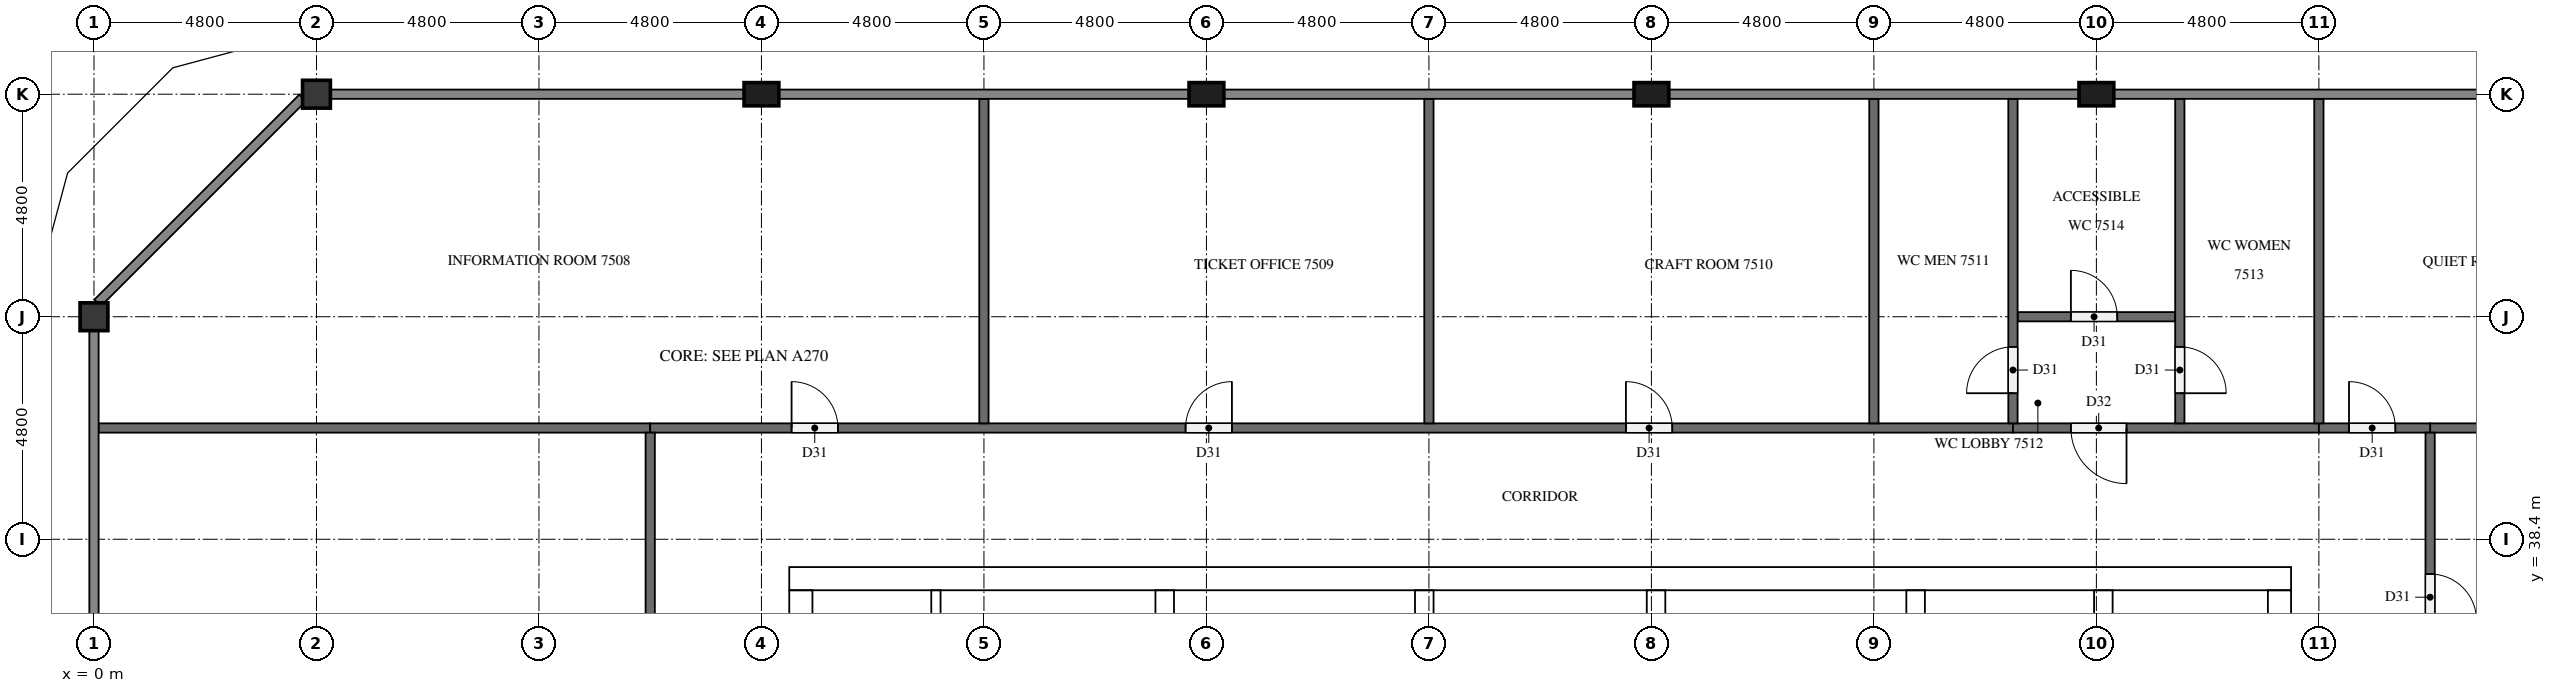
"""IFC4 building model, lengths in metres.
Left out: names, types, materials, properties, quantities, classifications, styles, units other than length and angle.
Written with IfcOpenShell. Run it as: python <this file> out.ifc"""

import sys

from ifc_helpers import new_model, si_unit, direction, frame, frame_2d, origin, origin_2d, place, context, subcontext, project, spatial, rectangle, extrude, element, fill, save


model = new_model("IFC4")
c1 = context("Model", 3, precision=1e-05, world=origin(), true_north=direction((0.0, 1.0)))
c2 = subcontext(c1, "Body", "Model", "MODEL_VIEW")
j1 = project(units=[si_unit("LENGTHUNIT", "METRE"), si_unit("PLANEANGLEUNIT", "RADIAN")], contexts=[c1])
p1 = place(None, origin())
s1 = spatial("IfcSite", under=j1, at=p1, CompositionType="ELEMENT")
p2 = place(p1, origin())
s2 = spatial("IfcBuilding", under=s1, at=p2, CompositionType="ELEMENT")
p3 = place(p2, frame((0.0, 0.0, 286.1)))
s3 = spatial("IfcBuildingStorey", under=s2, at=p3, CompositionType="ELEMENT", Elevation=286.1)
p4 = place(p3, frame((15.0, 37.55, 0.0), z_axis=(0.0, 0.0, 1.0), x_axis=(1.0, 0.0, 0.0)))
e1 = element("IfcWall", 1, at=p4, inside=s3, PredefinedType="SHEAR", context=c2, shape_type="SweptSolid", body=[
    extrude(rectangle(XDim=32.4, YDim=0.5, at=frame_2d((16.2, 0.0))), origin(), (0.0, 0.0, 1.0), 5.1),
])
p5 = place(p4, frame((15.3, 0.0, 0.0)))
e2 = element("IfcOpeningElement", 2, at=p5, cuts=e1, PredefinedType="OPENING", context=c2, shape_type="SweptSolid", body=[
    extrude(rectangle(XDim=1.8, YDim=2.1, at=frame_2d((0.9, 1.05))), frame((0.0, 0.26, 0.0), z_axis=(0.0, -1.0, 0.0), x_axis=(1.0, 0.0, 0.0)), (0.0, 0.0, 1.0), 0.52),
])
p6 = place(p4, frame((1.282, 0.0, 0.0)))
e3 = element("IfcOpeningElement", 3, at=p6, cuts=e1, PredefinedType="OPENING", context=c2, shape_type="SweptSolid", body=[
    extrude(rectangle(XDim=1.0, YDim=2.1, at=frame_2d((0.5, 1.05))), frame((0.0, 0.26, 0.0), z_axis=(0.0, -1.0, 0.0), x_axis=(1.0, 0.0, 0.0)), (0.0, 0.0, 1.0), 0.52),
])
p7 = place(p4, frame((5.082, 0.0, 0.0)))
e4 = element("IfcOpeningElement", 4, at=p7, cuts=e1, PredefinedType="OPENING", context=c2, shape_type="SweptSolid", body=[
    extrude(rectangle(XDim=1.0, YDim=2.1, at=frame_2d((0.5, 1.05))), frame((0.0, 0.26, 0.0), z_axis=(0.0, -1.0, 0.0), x_axis=(1.0, 0.0, 0.0)), (0.0, 0.0, 1.0), 0.52),
])
p8 = place(p3, frame((15.25, 15.5, 0.0), z_axis=(0.0, 0.0, 1.0), x_axis=(0.0, 1.0, 0.0)))
e5 = element("IfcWall", 5, at=p8, inside=s3, PredefinedType="SHEAR", context=c2, shape_type="SweptSolid", body=[
    extrude(rectangle(XDim=21.8, YDim=0.5, at=frame_2d((10.9, 0.0))), origin(), (0.0, 0.0, 1.0), 5.1),
])
p9 = place(p8, frame((5.26, 0.0, 0.0)))
e6 = element("IfcOpeningElement", 6, at=p9, cuts=e5, PredefinedType="OPENING", context=c2, shape_type="SweptSolid", body=[
    extrude(rectangle(XDim=1.2, YDim=2.1, at=frame_2d((0.6, 1.05))), frame((0.0, 0.26, 0.0), z_axis=(0.0, -1.0, 0.0), x_axis=(1.0, 0.0, 0.0)), (0.0, 0.0, 1.0), 0.52),
])
p10 = place(p3, frame((47.15, 15.5, 0.0), z_axis=(0.0, 0.0, 1.0), x_axis=(0.0, 1.0, 0.0)))
e7 = element("IfcWall", 7, at=p10, inside=s3, PredefinedType="SHEAR", context=c2, shape_type="SweptSolid", body=[
    extrude(rectangle(XDim=21.8, YDim=0.5, at=frame_2d((10.9, 0.0))), origin(), (0.0, 0.0, 1.0), 5.1),
])
p11 = place(p10, frame((10.6, 0.0, 0.0)))
e8 = element("IfcOpeningElement", 8, at=p11, cuts=e7, PredefinedType="OPENING", context=c2, shape_type="SweptSolid", body=[
    extrude(rectangle(XDim=1.2, YDim=2.1, at=frame_2d((0.6, 1.05))), frame((0.0, 0.26, 0.0), z_axis=(0.0, -1.0, 0.0), x_axis=(1.0, 0.0, 0.0)), (0.0, 0.0, 1.0), 0.52),
])
p12 = place(p3, frame((23.1, 15.5, 0.0), z_axis=(0.0, 0.0, 1.0), x_axis=(0.0, 1.0, 0.0)))
e9 = element("IfcWall", 9, at=p12, inside=s3, PredefinedType="SHEAR", context=c2, shape_type="SweptSolid", body=[
    extrude(rectangle(XDim=21.8, YDim=0.4, at=frame_2d((10.9, 0.0))), origin(), (0.0, 0.0, 1.0), 5.1),
])
p13 = place(p3, frame((39.3, 27.75, 0.0), z_axis=(0.0, 0.0, 1.0), x_axis=(0.0, 1.0, 0.0)))
e10 = element("IfcWall", 10, at=p13, inside=s3, PredefinedType="SHEAR", context=c2, shape_type="SweptSolid", body=[
    extrude(rectangle(XDim=9.55, YDim=0.4, at=frame_2d((4.775, 0.0))), origin(), (0.0, 0.0, 1.0), 5.1),
])
p14 = place(p3, frame((43.35, 27.75, 0.0), z_axis=(0.0, 0.0, 1.0), x_axis=(0.0, 1.0, 0.0)))
e11 = element("IfcWall", 11, at=p14, inside=s3, PredefinedType="SHEAR", context=c2, shape_type="SweptSolid", body=[
    extrude(rectangle(XDim=9.55, YDim=0.4, at=frame_2d((4.775, 0.0))), origin(), (0.0, 0.0, 1.0), 5.1),
])
p15 = place(p14, frame((7.65, 0.0, 0.0)))
e12 = element("IfcOpeningElement", 12, at=p15, cuts=e11, PredefinedType="OPENING", context=c2, shape_type="SweptSolid", body=[
    extrude(rectangle(XDim=1.2, YDim=2.1, at=frame_2d((0.6, 1.05))), frame((0.0, 0.21, 0.0), z_axis=(0.0, -1.0, 0.0), x_axis=(1.0, 0.0, 0.0)), (0.0, 0.0, 1.0), 0.42),
])
for number, where, z_axis, x_axis in (
    (13, (28.7, 33.75, 0.0), (0.0, 0.0, 1.0), (0.0, 1.0, 0.0)),
    (14, (33.7, 33.75, 0.0), (0.0, 0.0, 1.0), (0.0, 1.0, 0.0)),
):
    element("IfcWall", number, at=place(p3, frame(where, z_axis=z_axis, x_axis=x_axis)), inside=s3, PredefinedType="SHEAR", context=c2, shape_type="SweptSolid", body=[
        extrude(rectangle(XDim=3.55, YDim=0.4, at=frame_2d((1.775, 0.0))), origin(), (0.0, 0.0, 1.0), 5.1),
    ])
for number, where, z_axis, x_axis in (
    (15, (43.2, 48.0, 0.0), (0.0, 0.0, 1.0), (1.0, 0.0, 0.0)),
    (16, (33.6, 48.0, 0.0), (0.0, 0.0, 1.0), (1.0, 0.0, 0.0)),
    (17, (24.0, 48.0, 0.0), (0.0, 0.0, 1.0), (1.0, 0.0, 0.0)),
    (18, (14.4, 48.0, 0.0), (0.0, 0.0, 1.0), (1.0, 0.0, 0.0)),
):
    element("IfcColumn", number, at=place(p3, frame(where, z_axis=z_axis, x_axis=x_axis)), inside=s3, PredefinedType="COLUMN", context=c2, shape_type="SweptSolid", body=[
        extrude(rectangle(XDim=0.75, YDim=0.5, at=origin_2d()), origin(), (0.0, 0.0, 1.0), 5.1),
    ])
for number, where, z_axis, x_axis in (
    (19, (4.8, 48.0, 0.0), (0.0, 0.0, 1.0), (1.0, 0.0, 0.0)),
    (20, (0.0, 43.2, 0.0), (0.0, 0.0, 1.0), (1.0, 0.0, 0.0)),
):
    element("IfcColumn", number, at=place(p3, frame(where, z_axis=z_axis, x_axis=x_axis)), inside=s3, PredefinedType="COLUMN", context=c2, shape_type="SweptSolid", body=[
        extrude(rectangle(XDim=0.6, YDim=0.6, at=origin_2d()), origin(), (0.0, 0.0, 1.0), 5.1),
    ])
p16 = place(p3, frame((18.164, 31.45, 0.0), z_axis=(0.0, 0.0, 1.0), x_axis=(0.0, 1.0, 0.0)))
e21 = element("IfcWall", 21, at=p16, inside=s3, PredefinedType="PARTITIONING", context=c2, shape_type="SweptSolid", body=[
    extrude(rectangle(XDim=5.85, YDim=0.2, at=frame_2d((2.925, 0.0))), origin(), (0.0, 0.0, 1.0), 5.1),
])
p17 = place(p3, frame((0.1, 40.8, 0.0), z_axis=(0.0, 0.0, 1.0), x_axis=(1.0, 0.0, 0.0)))
e22 = element("IfcWall", 22, at=p17, inside=s3, PredefinedType="PARTITIONING", context=c2, shape_type="SweptSolid", body=[
    extrude(rectangle(XDim=11.9, YDim=0.2, at=frame_2d((5.95, 0.0))), origin(), (0.0, 0.0, 1.0), 5.1),
])
p18 = place(p3, frame((50.4, 40.8, 0.0), z_axis=(0.0, 0.0, 1.0), x_axis=(1.0, 0.0, 0.0)))
e23 = element("IfcWall", 23, at=p18, inside=s3, PredefinedType="PARTITIONING", context=c2, shape_type="SweptSolid", body=[
    extrude(rectangle(XDim=7.1, YDim=0.2, at=frame_2d((3.55, 0.0))), origin(), (0.0, 0.0, 1.0), 5.1),
])
p19 = place(p3, frame((12.0, 40.8, 0.0), z_axis=(0.0, 0.0, 1.0), x_axis=(1.0, 0.0, 0.0)))
e24 = element("IfcWall", 24, at=p19, inside=s3, PredefinedType="PARTITIONING", context=c2, shape_type="SweptSolid", body=[
    extrude(rectangle(XDim=29.4, YDim=0.2, at=frame_2d((14.7, 0.0))), origin(), (0.0, 0.0, 1.0), 5.1),
])
p20 = place(p19, frame((3.05, 0.0, 0.0)))
e25 = element("IfcOpeningElement", 25, at=p20, cuts=e24, PredefinedType="OPENING", context=c2, shape_type="SweptSolid", body=[
    extrude(rectangle(XDim=1.0, YDim=2.1, at=frame_2d((0.5, 1.05))), frame((0.0, 0.11, 0.0), z_axis=(0.0, -1.0, 0.0), x_axis=(1.0, 0.0, 0.0)), (0.0, 0.0, 1.0), 0.22),
])
p21 = place(p19, frame((11.55, 0.0, 0.0)))
e26 = element("IfcOpeningElement", 26, at=p21, cuts=e24, PredefinedType="OPENING", context=c2, shape_type="SweptSolid", body=[
    extrude(rectangle(XDim=1.0, YDim=2.1, at=frame_2d((0.5, 1.05))), frame((0.0, 0.11, 0.0), z_axis=(0.0, -1.0, 0.0), x_axis=(1.0, 0.0, 0.0)), (0.0, 0.0, 1.0), 0.22),
])
p22 = place(p19, frame((21.05, 0.0, 0.0)))
e27 = element("IfcOpeningElement", 27, at=p22, cuts=e24, PredefinedType="OPENING", context=c2, shape_type="SweptSolid", body=[
    extrude(rectangle(XDim=1.0, YDim=2.1, at=frame_2d((0.5, 1.05))), frame((0.0, 0.11, 0.0), z_axis=(0.0, -1.0, 0.0), x_axis=(1.0, 0.0, 0.0)), (0.0, 0.0, 1.0), 0.22),
])
p23 = place(p3, frame((48.0, 40.8, 0.0), z_axis=(0.0, 0.0, 1.0), x_axis=(-1.0, 0.0, 0.0)))
e28 = element("IfcWall", 28, at=p23, inside=s3, PredefinedType="PARTITIONING", context=c2, shape_type="SweptSolid", body=[
    extrude(rectangle(XDim=6.6, YDim=0.2, at=frame_2d((3.3, 0.0))), origin(), (0.0, 0.0, 1.0), 5.1),
])
p24 = place(p23, frame((4.15, 0.0, 0.0)))
e29 = element("IfcOpeningElement", 29, at=p24, cuts=e28, PredefinedType="OPENING", context=c2, shape_type="SweptSolid", body=[
    extrude(rectangle(XDim=1.2, YDim=2.1, at=frame_2d((0.6, 1.05))), frame((0.0, 0.11, 0.0), z_axis=(0.0, -1.0, 0.0), x_axis=(1.0, 0.0, 0.0)), (0.0, 0.0, 1.0), 0.22),
])
p25 = place(p3, frame((48.0, 40.8, 0.0), z_axis=(0.0, 0.0, 1.0), x_axis=(1.0, 0.0, 0.0)))
e30 = element("IfcWall", 30, at=p25, inside=s3, PredefinedType="PARTITIONING", context=c2, shape_type="SweptSolid", body=[
    extrude(rectangle(XDim=2.4, YDim=0.2, at=frame_2d((1.2, 0.0))), origin(), (0.0, 0.0, 1.0), 5.1),
])
p26 = place(p25, frame((0.65, 0.0, 0.0)))
e31 = element("IfcOpeningElement", 31, at=p26, cuts=e30, PredefinedType="OPENING", context=c2, shape_type="SweptSolid", body=[
    extrude(rectangle(XDim=1.0, YDim=2.1, at=frame_2d((0.5, 1.05))), frame((0.0, 0.11, 0.0), z_axis=(0.0, -1.0, 0.0), x_axis=(1.0, 0.0, 0.0)), (0.0, 0.0, 1.0), 0.22),
])
p27 = place(p3, frame((41.5, 43.2, 0.0), z_axis=(0.0, 0.0, 1.0), x_axis=(1.0, 0.0, 0.0)))
e32 = element("IfcWall", 32, at=p27, inside=s3, PredefinedType="PARTITIONING", context=c2, shape_type="SweptSolid", body=[
    extrude(rectangle(XDim=3.4, YDim=0.2, at=frame_2d((1.7, 0.0))), origin(), (0.0, 0.0, 1.0), 5.1),
])
p28 = place(p27, frame((1.15, 0.0, 0.0)))
e33 = element("IfcOpeningElement", 33, at=p28, cuts=e32, PredefinedType="OPENING", context=c2, shape_type="SweptSolid", body=[
    extrude(rectangle(XDim=1.0, YDim=2.1, at=frame_2d((0.5, 1.05))), frame((0.0, 0.11, 0.0), z_axis=(0.0, -1.0, 0.0), x_axis=(1.0, 0.0, 0.0)), (0.0, 0.0, 1.0), 0.22),
])
p29 = place(p3, frame((12.0, 12.1, 0.0), z_axis=(0.0, 0.0, 1.0), x_axis=(0.0, 1.0, 0.0)))
e34 = element("IfcWall", 34, at=p29, inside=s3, PredefinedType="PARTITIONING", context=c2, shape_type="SweptSolid", body=[
    extrude(rectangle(XDim=28.6, YDim=0.2, at=frame_2d((14.3, 0.0))), origin(), (0.0, 0.0, 1.0), 5.1),
])
p30 = place(p29, frame((3.05, 0.0, 0.0)))
e35 = element("IfcOpeningElement", 35, at=p30, cuts=e34, PredefinedType="OPENING", context=c2, shape_type="SweptSolid", body=[
    extrude(rectangle(XDim=1.0, YDim=2.1, at=frame_2d((0.5, 1.05))), frame((0.0, 0.11, 0.0), z_axis=(0.0, -1.0, 0.0), x_axis=(1.0, 0.0, 0.0)), (0.0, 0.0, 1.0), 0.22),
])
p31 = place(p29, frame((11.45, 0.0, 0.0)))
e36 = element("IfcOpeningElement", 36, at=p31, cuts=e34, PredefinedType="OPENING", context=c2, shape_type="SweptSolid", body=[
    extrude(rectangle(XDim=1.0, YDim=2.1, at=frame_2d((0.5, 1.05))), frame((0.0, 0.11, 0.0), z_axis=(0.0, -1.0, 0.0), x_axis=(1.0, 0.0, 0.0)), (0.0, 0.0, 1.0), 0.22),
])
p32 = place(p29, frame((22.15, 0.0, 0.0)))
e37 = element("IfcOpeningElement", 37, at=p32, cuts=e34, PredefinedType="OPENING", context=c2, shape_type="SweptSolid", body=[
    extrude(rectangle(XDim=1.0, YDim=2.1, at=frame_2d((0.5, 1.05))), frame((0.0, 0.11, 0.0), z_axis=(0.0, -1.0, 0.0), x_axis=(1.0, 0.0, 0.0)), (0.0, 0.0, 1.0), 0.22),
])
for number, where, z_axis, x_axis in (
    (38, (19.2, 40.9, 0.0), (0.0, 0.0, 1.0), (0.0, 1.0, 0.0)),
    (39, (28.8, 40.9, 0.0), (0.0, 0.0, 1.0), (0.0, 1.0, 0.0)),
    (40, (38.4, 40.9, 0.0), (0.0, 0.0, 1.0), (0.0, 1.0, 0.0)),
):
    element("IfcWall", number, at=place(p3, frame(where, z_axis=z_axis, x_axis=x_axis)), inside=s3, PredefinedType="PARTITIONING", context=c2, shape_type="SweptSolid", body=[
        extrude(rectangle(XDim=7.0, YDim=0.2, at=frame_2d((3.5, 0.0))), origin(), (0.0, 0.0, 1.0), 5.1),
    ])
p33 = place(p3, frame((41.4, 40.9, 0.0), z_axis=(0.0, 0.0, 1.0), x_axis=(0.0, 1.0, 0.0)))
e41 = element("IfcWall", 41, at=p33, inside=s3, PredefinedType="PARTITIONING", context=c2, shape_type="SweptSolid", body=[
    extrude(rectangle(XDim=7.0, YDim=0.2, at=frame_2d((3.5, 0.0))), origin(), (0.0, 0.0, 1.0), 5.1),
])
p34 = place(p33, frame((0.65, 0.0, 0.0)))
e42 = element("IfcOpeningElement", 42, at=p34, cuts=e41, PredefinedType="OPENING", context=c2, shape_type="SweptSolid", body=[
    extrude(rectangle(XDim=1.0, YDim=2.1, at=frame_2d((0.5, 1.05))), frame((0.0, 0.11, 0.0), z_axis=(0.0, -1.0, 0.0), x_axis=(1.0, 0.0, 0.0)), (0.0, 0.0, 1.0), 0.22),
])
p35 = place(p3, frame((45.0, 47.9, 0.0), z_axis=(0.0, 0.0, 1.0), x_axis=(0.0, -1.0, 0.0)))
e43 = element("IfcWall", 43, at=p35, inside=s3, PredefinedType="PARTITIONING", context=c2, shape_type="SweptSolid", body=[
    extrude(rectangle(XDim=7.0, YDim=0.2, at=frame_2d((3.5, 0.0))), origin(), (0.0, 0.0, 1.0), 5.1),
])
p36 = place(p35, frame((5.35, 0.0, 0.0)))
e44 = element("IfcOpeningElement", 44, at=p36, cuts=e43, PredefinedType="OPENING", context=c2, shape_type="SweptSolid", body=[
    extrude(rectangle(XDim=1.0, YDim=2.1, at=frame_2d((0.5, 1.05))), frame((0.0, 0.11, 0.0), z_axis=(0.0, -1.0, 0.0), x_axis=(1.0, 0.0, 0.0)), (0.0, 0.0, 1.0), 0.22),
])
p37 = place(p3, frame((48.0, 40.9, 0.0), z_axis=(0.0, 0.0, 1.0), x_axis=(0.0, 1.0, 0.0)))
e45 = element("IfcWall", 45, at=p37, inside=s3, PredefinedType="PARTITIONING", context=c2, shape_type="SweptSolid", body=[
    extrude(rectangle(XDim=7.0, YDim=0.2, at=frame_2d((3.5, 0.0))), origin(), (0.0, 0.0, 1.0), 5.1),
])
p38 = place(p3, frame((50.4, 40.7, 0.0), z_axis=(0.0, 0.0, 1.0), x_axis=(0.0, -1.0, 0.0)))
e46 = element("IfcWall", 46, at=p38, inside=s3, PredefinedType="PARTITIONING", context=c2, shape_type="SweptSolid", body=[
    extrude(rectangle(XDim=28.6, YDim=0.2, at=frame_2d((14.3, 0.0))), origin(), (0.0, 0.0, 1.0), 5.1),
])
p39 = place(p38, frame((22.15, 0.0, 0.0)))
e47 = element("IfcOpeningElement", 47, at=p39, cuts=e46, PredefinedType="OPENING", context=c2, shape_type="SweptSolid", body=[
    extrude(rectangle(XDim=1.0, YDim=2.1, at=frame_2d((0.5, 1.05))), frame((0.0, 0.11, 0.0), z_axis=(0.0, -1.0, 0.0), x_axis=(1.0, 0.0, 0.0)), (0.0, 0.0, 1.0), 0.22),
])
p40 = place(p38, frame((11.45, 0.0, 0.0)))
e48 = element("IfcOpeningElement", 48, at=p40, cuts=e46, PredefinedType="OPENING", context=c2, shape_type="SweptSolid", body=[
    extrude(rectangle(XDim=1.0, YDim=2.1, at=frame_2d((0.5, 1.05))), frame((0.0, 0.11, 0.0), z_axis=(0.0, -1.0, 0.0), x_axis=(1.0, 0.0, 0.0)), (0.0, 0.0, 1.0), 0.22),
])
p41 = place(p38, frame((3.05, 0.0, 0.0)))
e49 = element("IfcOpeningElement", 49, at=p41, cuts=e46, PredefinedType="OPENING", context=c2, shape_type="SweptSolid", body=[
    extrude(rectangle(XDim=1.0, YDim=2.1, at=frame_2d((0.5, 1.05))), frame((0.0, 0.11, 0.0), z_axis=(0.0, -1.0, 0.0), x_axis=(1.0, 0.0, 0.0)), (0.0, 0.0, 1.0), 0.22),
])
p42 = place(p5, origin())
e50 = element("IfcDoor", 50, at=p42, inside=s3, OperationType="DOUBLE_DOOR_SINGLE_SWING", PredefinedType="DOOR", context=c2, shape_type="SweptSolid", body=[
    extrude(rectangle(XDim=1.8, YDim=2.1, at=frame_2d((0.9, 1.05))), frame((0.0, 0.025, 0.0), z_axis=(0.0, -1.0, 0.0), x_axis=(1.0, 0.0, 0.0)), (0.0, 0.0, 1.0), 0.05),
])
fill(e2, e50)
p43 = place(p6, origin())
e51 = element("IfcDoor", 51, at=p43, inside=s3, OperationType="SINGLE_SWING_RIGHT", PredefinedType="DOOR", context=c2, shape_type="SweptSolid", body=[
    extrude(rectangle(XDim=1.0, YDim=2.1, at=frame_2d((0.5, 1.05))), frame((0.0, 0.025, 0.0), z_axis=(0.0, -1.0, 0.0), x_axis=(1.0, 0.0, 0.0)), (0.0, 0.0, 1.0), 0.05),
])
fill(e3, e51)
p44 = place(p7, origin())
e52 = element("IfcDoor", 52, at=p44, inside=s3, OperationType="SINGLE_SWING_LEFT", PredefinedType="DOOR", context=c2, shape_type="SweptSolid", body=[
    extrude(rectangle(XDim=1.0, YDim=2.1, at=frame_2d((0.5, 1.05))), frame((0.0, 0.025, 0.0), z_axis=(0.0, -1.0, 0.0), x_axis=(1.0, 0.0, 0.0)), (0.0, 0.0, 1.0), 0.05),
])
fill(e4, e52)
p45 = place(p20, origin())
e53 = element("IfcDoor", 53, at=p45, inside=s3, OperationType="SINGLE_SWING_LEFT", PredefinedType="DOOR", context=c2, shape_type="SweptSolid", body=[
    extrude(rectangle(XDim=1.0, YDim=2.1, at=frame_2d((0.5, 1.05))), frame((0.0, 0.025, 0.0), z_axis=(0.0, -1.0, 0.0), x_axis=(1.0, 0.0, 0.0)), (0.0, 0.0, 1.0), 0.05),
])
fill(e25, e53)
p46 = place(p21, origin())
e54 = element("IfcDoor", 54, at=p46, inside=s3, OperationType="SINGLE_SWING_RIGHT", PredefinedType="DOOR", context=c2, shape_type="SweptSolid", body=[
    extrude(rectangle(XDim=1.0, YDim=2.1, at=frame_2d((0.5, 1.05))), frame((0.0, 0.025, 0.0), z_axis=(0.0, -1.0, 0.0), x_axis=(1.0, 0.0, 0.0)), (0.0, 0.0, 1.0), 0.05),
])
fill(e26, e54)
p47 = place(p22, origin())
e55 = element("IfcDoor", 55, at=p47, inside=s3, OperationType="SINGLE_SWING_LEFT", PredefinedType="DOOR", context=c2, shape_type="SweptSolid", body=[
    extrude(rectangle(XDim=1.0, YDim=2.1, at=frame_2d((0.5, 1.05))), frame((0.0, 0.025, 0.0), z_axis=(0.0, -1.0, 0.0), x_axis=(1.0, 0.0, 0.0)), (0.0, 0.0, 1.0), 0.05),
])
fill(e27, e55)
p48 = place(p24, origin())
e56 = element("IfcDoor", 56, at=p48, inside=s3, OperationType="SINGLE_SWING_LEFT", PredefinedType="DOOR", context=c2, shape_type="SweptSolid", body=[
    extrude(rectangle(XDim=1.2, YDim=2.1, at=frame_2d((0.6, 1.05))), frame((0.0, 0.025, 0.0), z_axis=(0.0, -1.0, 0.0), x_axis=(1.0, 0.0, 0.0)), (0.0, 0.0, 1.0), 0.05),
])
fill(e29, e56)
p49 = place(p34, origin())
e57 = element("IfcDoor", 57, at=p49, inside=s3, OperationType="SINGLE_SWING_LEFT", PredefinedType="DOOR", context=c2, shape_type="SweptSolid", body=[
    extrude(rectangle(XDim=1.0, YDim=2.1, at=frame_2d((0.5, 1.05))), frame((0.0, 0.025, 0.0), z_axis=(0.0, -1.0, 0.0), x_axis=(1.0, 0.0, 0.0)), (0.0, 0.0, 1.0), 0.05),
])
fill(e42, e57)
p50 = place(p36, origin())
e58 = element("IfcDoor", 58, at=p50, inside=s3, OperationType="SINGLE_SWING_RIGHT", PredefinedType="DOOR", context=c2, shape_type="SweptSolid", body=[
    extrude(rectangle(XDim=1.0, YDim=2.1, at=frame_2d((0.5, 1.05))), frame((0.0, 0.025, 0.0), z_axis=(0.0, -1.0, 0.0), x_axis=(1.0, 0.0, 0.0)), (0.0, 0.0, 1.0), 0.05),
])
fill(e44, e58)
p51 = place(p28, origin())
e59 = element("IfcDoor", 59, at=p51, inside=s3, OperationType="SINGLE_SWING_LEFT", PredefinedType="DOOR", context=c2, shape_type="SweptSolid", body=[
    extrude(rectangle(XDim=1.0, YDim=2.1, at=frame_2d((0.5, 1.05))), frame((0.0, 0.025, 0.0), z_axis=(0.0, -1.0, 0.0), x_axis=(1.0, 0.0, 0.0)), (0.0, 0.0, 1.0), 0.05),
])
fill(e33, e59)
p52 = place(p26, origin())
e60 = element("IfcDoor", 60, at=p52, inside=s3, OperationType="SINGLE_SWING_LEFT", PredefinedType="DOOR", context=c2, shape_type="SweptSolid", body=[
    extrude(rectangle(XDim=1.0, YDim=2.1, at=frame_2d((0.5, 1.05))), frame((0.0, 0.025, 0.0), z_axis=(0.0, -1.0, 0.0), x_axis=(1.0, 0.0, 0.0)), (0.0, 0.0, 1.0), 0.05),
])
fill(e31, e60)
p53 = place(p41, origin())
e61 = element("IfcDoor", 61, at=p53, inside=s3, OperationType="SINGLE_SWING_RIGHT", PredefinedType="DOOR", context=c2, shape_type="SweptSolid", body=[
    extrude(rectangle(XDim=1.0, YDim=2.1, at=frame_2d((0.5, 1.05))), frame((0.0, 0.025, 0.0), z_axis=(0.0, -1.0, 0.0), x_axis=(1.0, 0.0, 0.0)), (0.0, 0.0, 1.0), 0.05),
])
fill(e49, e61)
save(model, sys.argv[1])
